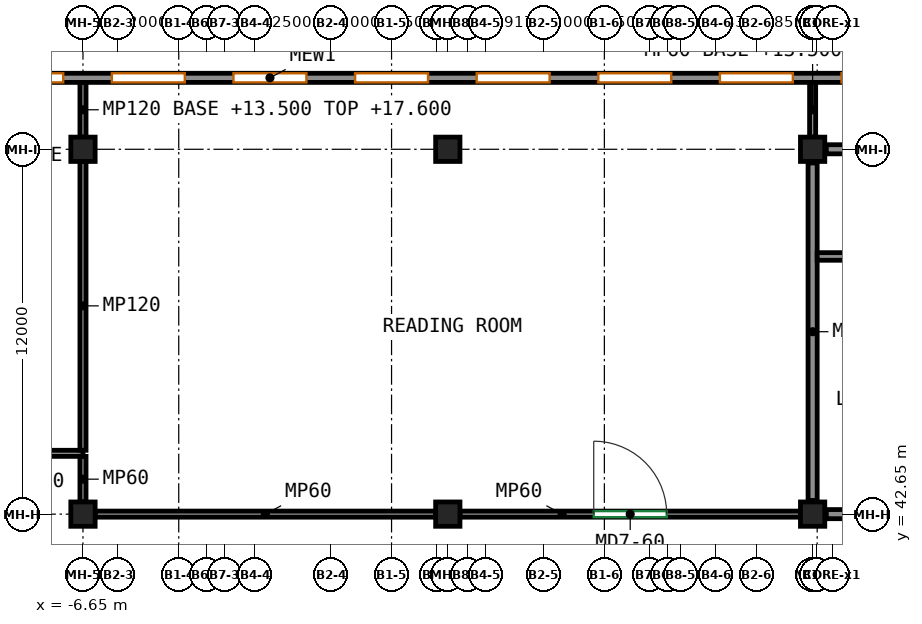
"""IFC4 building model, lengths in metres.
Left out: names, types, materials, properties, quantities, classifications, styles, units other than length and angle.
Written with IfcOpenShell. Run it as: python <this file> out.ifc"""

import sys

from ifc_helpers import new_model, si_unit, direction, frame, frame_2d, origin, origin_2d, place, context, subcontext, project, spatial, rectangle, extrude, source, transform, mapped, element, fill, save


model = new_model("IFC4")
c1 = context("Model", 3, precision=1e-05, world=origin(), true_north=direction((0.0, 1.0)))
c2 = subcontext(c1, "Body", "Model", "MODEL_VIEW")
j1 = project(units=[si_unit("LENGTHUNIT", "METRE"), si_unit("PLANEANGLEUNIT", "RADIAN")], contexts=[c1])
p1 = place(None, origin())
s1 = spatial("IfcSite", under=j1, at=p1, CompositionType="ELEMENT")
p2 = place(p1, origin())
s2 = spatial("IfcBuilding", under=s1, at=p2, CompositionType="ELEMENT")
p3 = place(p2, frame((0.0, 0.0, 13.5)))
s3 = spatial("IfcBuildingStorey", under=s2, at=p3, CompositionType="ELEMENT", Elevation=13.5)
m1 = source(origin(), c2, "Body", "SweptSolid", [
    extrude(rectangle(XDim=0.8, YDim=0.8, at=origin_2d()), origin(), (0.0, 0.0, 1.0), 4.1),
])
for number, where, z_axis, x_axis in (
    (1, (-6.65, 42.65, 0.0), (0.0, 0.0, 1.0), (1.0, 0.0, 0.0)),
    (2, (-6.65, 54.65, 0.0), (0.0, 0.0, 1.0), (1.0, 0.0, 0.0)),
    (3, (5.35, 42.65, 0.0), (0.0, 0.0, 1.0), (1.0, 0.0, 0.0)),
    (4, (5.35, 54.65, 0.0), (0.0, 0.0, 1.0), (1.0, 0.0, 0.0)),
    (5, (17.35, 42.65, 0.0), (0.0, 0.0, 1.0), (1.0, 0.0, 0.0)),
    (6, (17.35, 54.65, 0.0), (0.0, 0.0, 1.0), (1.0, 0.0, 0.0)),
):
    element("IfcColumn", number, at=place(p3, frame(where, z_axis=z_axis, x_axis=x_axis)), inside=s3, PredefinedType="COLUMN", context=c2, shape_type="MappedRepresentation", body=[
        mapped(m1, transform((0.0, 0.0, 0.0))),
    ])
m2 = source(origin(), c2, "Body", "SweptSolid", [
    extrude(rectangle(XDim=12.4, YDim=0.3, at=frame_2d((6.2, 0.0))), origin(), (0.0, 0.0, 1.0), 3.3),
])
p4 = place(p3, frame((30.2, 54.65, 0.0), z_axis=(0.0, 0.0, 1.0), x_axis=(-1.0, 0.0, 0.0)))
e7 = element("IfcWall", 7, at=p4, inside=s3, PredefinedType="SHEAR", context=c2, shape_type="MappedRepresentation", body=[
    mapped(m2, transform((0.0, 0.0, 0.0))),
])
p5 = place(p4, frame((5.7, 0.0, 0.0)))
e8 = element("IfcOpeningElement", 8, at=p5, cuts=e7, PredefinedType="OPENING", context=c2, shape_type="SweptSolid", body=[
    extrude(rectangle(XDim=1.0, YDim=2.1, at=frame_2d((0.5, 1.05))), frame((0.0, 0.16, 0.0), z_axis=(0.0, -1.0, 0.0), x_axis=(1.0, 0.0, 0.0)), (0.0, 0.0, 1.0), 0.32),
])
p6 = place(p3, frame((30.2, 42.65, 0.0), z_axis=(0.0, 0.0, 1.0), x_axis=(-1.0, 0.0, 0.0)))
e9 = element("IfcWall", 9, at=p6, inside=s3, PredefinedType="SHEAR", context=c2, shape_type="MappedRepresentation", body=[
    mapped(m2, transform((0.0, 0.0, 0.0))),
])
p7 = place(p6, frame((5.2, 0.0, 0.0)))
e10 = element("IfcOpeningElement", 10, at=p7, cuts=e9, PredefinedType="OPENING", context=c2, shape_type="SweptSolid", body=[
    extrude(rectangle(XDim=2.0, YDim=2.4, at=frame_2d((1.0, 1.2))), frame((0.0, 0.16, 0.0), z_axis=(0.0, -1.0, 0.0), x_axis=(1.0, 0.0, 0.0)), (0.0, 0.0, 1.0), 0.32),
])
m3 = source(origin(), c2, "Body", "SweptSolid", [
    extrude(rectangle(XDim=11.1, YDim=0.3, at=frame_2d((5.55, 0.0))), origin(), (0.0, 0.0, 1.0), 3.3),
])
p8 = place(p3, frame((17.35, 54.2, 0.0), z_axis=(0.0, 0.0, 1.0), x_axis=(0.0, -1.0, 0.0)))
e11 = element("IfcWall", 11, at=p8, inside=s3, PredefinedType="SHEAR", context=c2, shape_type="MappedRepresentation", body=[
    mapped(m3, transform((0.0, 0.0, 0.0))),
])
m4 = source(origin(), c2, "Body", "SweptSolid", [
    extrude(rectangle(XDim=4.15, YDim=0.25, at=frame_2d((2.075, 0.0))), origin(), (0.0, 0.0, 1.0), 4.1),
])
p9 = place(p3, frame((21.65, 51.125, 0.0), z_axis=(0.0, 0.0, 1.0), x_axis=(-1.0, 0.0, 0.0)))
e12 = element("IfcWall", 12, at=p9, inside=s3, PredefinedType="SHEAR", context=c2, shape_type="MappedRepresentation", body=[
    mapped(m4, transform((0.0, 0.0, 0.0))),
])
p10 = place(p9, frame((1.4, 0.0, 0.0)))
e13 = element("IfcOpeningElement", 13, at=p10, cuts=e12, PredefinedType="OPENING", context=c2, shape_type="SweptSolid", body=[
    extrude(rectangle(XDim=1.1, YDim=2.1, at=frame_2d((0.55, 1.05))), frame((0.0, 0.135, 0.0), z_axis=(0.0, -1.0, 0.0), x_axis=(1.0, 0.0, 0.0)), (0.0, 0.0, 1.0), 0.27),
])
m5 = source(origin(), c2, "Body", "SweptSolid", [
    extrude(rectangle(XDim=112.7, YDim=0.3, at=frame_2d((56.35, 0.0))), origin(), (0.0, 0.0, 1.0), 4.1),
])
p11 = place(p3, frame((-56.85, 57.0, 0.0), z_axis=(0.0, 0.0, 1.0), x_axis=(1.0, 0.0, 0.0)))
e14 = element("IfcWall", 14, at=p11, inside=s3, PredefinedType="SOLIDWALL", context=c2, shape_type="MappedRepresentation", body=[
    mapped(m5, transform((0.0, 0.0, 0.0))),
])
p12 = place(p11, frame((3.15, 0.0, 0.9)))
e15 = element("IfcOpeningElement", 15, at=p12, cuts=e14, PredefinedType="OPENING", context=c2, shape_type="SweptSolid", body=[
    extrude(rectangle(XDim=2.4, YDim=1.8, at=frame_2d((1.2, 0.9))), frame((0.0, 0.16, 0.0), z_axis=(0.0, -1.0, 0.0), x_axis=(1.0, 0.0, 0.0)), (0.0, 0.0, 1.0), 0.32),
])
p13 = place(p11, frame((7.15, 0.0, 0.9)))
e16 = element("IfcOpeningElement", 16, at=p13, cuts=e14, PredefinedType="OPENING", context=c2, shape_type="SweptSolid", body=[
    extrude(rectangle(XDim=2.4, YDim=1.8, at=frame_2d((1.2, 0.9))), frame((0.0, 0.16, 0.0), z_axis=(0.0, -1.0, 0.0), x_axis=(1.0, 0.0, 0.0)), (0.0, 0.0, 1.0), 0.32),
])
p14 = place(p11, frame((11.15, 0.0, 0.9)))
e17 = element("IfcOpeningElement", 17, at=p14, cuts=e14, PredefinedType="OPENING", context=c2, shape_type="SweptSolid", body=[
    extrude(rectangle(XDim=2.4, YDim=1.8, at=frame_2d((1.2, 0.9))), frame((0.0, 0.16, 0.0), z_axis=(0.0, -1.0, 0.0), x_axis=(1.0, 0.0, 0.0)), (0.0, 0.0, 1.0), 0.32),
])
p15 = place(p11, frame((15.15, 0.0, 0.9)))
e18 = element("IfcOpeningElement", 18, at=p15, cuts=e14, PredefinedType="OPENING", context=c2, shape_type="SweptSolid", body=[
    extrude(rectangle(XDim=2.4, YDim=1.8, at=frame_2d((1.2, 0.9))), frame((0.0, 0.16, 0.0), z_axis=(0.0, -1.0, 0.0), x_axis=(1.0, 0.0, 0.0)), (0.0, 0.0, 1.0), 0.32),
])
p16 = place(p11, frame((19.15, 0.0, 0.9)))
e19 = element("IfcOpeningElement", 19, at=p16, cuts=e14, PredefinedType="OPENING", context=c2, shape_type="SweptSolid", body=[
    extrude(rectangle(XDim=2.4, YDim=1.8, at=frame_2d((1.2, 0.9))), frame((0.0, 0.16, 0.0), z_axis=(0.0, -1.0, 0.0), x_axis=(1.0, 0.0, 0.0)), (0.0, 0.0, 1.0), 0.32),
])
p17 = place(p11, frame((23.15, 0.0, 0.9)))
e20 = element("IfcOpeningElement", 20, at=p17, cuts=e14, PredefinedType="OPENING", context=c2, shape_type="SweptSolid", body=[
    extrude(rectangle(XDim=2.4, YDim=1.8, at=frame_2d((1.2, 0.9))), frame((0.0, 0.16, 0.0), z_axis=(0.0, -1.0, 0.0), x_axis=(1.0, 0.0, 0.0)), (0.0, 0.0, 1.0), 0.32),
])
p18 = place(p11, frame((27.15, 0.0, 0.9)))
e21 = element("IfcOpeningElement", 21, at=p18, cuts=e14, PredefinedType="OPENING", context=c2, shape_type="SweptSolid", body=[
    extrude(rectangle(XDim=2.4, YDim=1.8, at=frame_2d((1.2, 0.9))), frame((0.0, 0.16, 0.0), z_axis=(0.0, -1.0, 0.0), x_axis=(1.0, 0.0, 0.0)), (0.0, 0.0, 1.0), 0.32),
])
p19 = place(p11, frame((31.15, 0.0, 0.9)))
e22 = element("IfcOpeningElement", 22, at=p19, cuts=e14, PredefinedType="OPENING", context=c2, shape_type="SweptSolid", body=[
    extrude(rectangle(XDim=2.4, YDim=1.8, at=frame_2d((1.2, 0.9))), frame((0.0, 0.16, 0.0), z_axis=(0.0, -1.0, 0.0), x_axis=(1.0, 0.0, 0.0)), (0.0, 0.0, 1.0), 0.32),
])
p20 = place(p11, frame((35.15, 0.0, 0.9)))
e23 = element("IfcOpeningElement", 23, at=p20, cuts=e14, PredefinedType="OPENING", context=c2, shape_type="SweptSolid", body=[
    extrude(rectangle(XDim=2.4, YDim=1.8, at=frame_2d((1.2, 0.9))), frame((0.0, 0.16, 0.0), z_axis=(0.0, -1.0, 0.0), x_axis=(1.0, 0.0, 0.0)), (0.0, 0.0, 1.0), 0.32),
])
p21 = place(p11, frame((43.15, 0.0, 0.9)))
e24 = element("IfcOpeningElement", 24, at=p21, cuts=e14, PredefinedType="OPENING", context=c2, shape_type="SweptSolid", body=[
    extrude(rectangle(XDim=2.4, YDim=1.8, at=frame_2d((1.2, 0.9))), frame((0.0, 0.16, 0.0), z_axis=(0.0, -1.0, 0.0), x_axis=(1.0, 0.0, 0.0)), (0.0, 0.0, 1.0), 0.32),
])
p22 = place(p11, frame((47.15, 0.0, 0.9)))
e25 = element("IfcOpeningElement", 25, at=p22, cuts=e14, PredefinedType="OPENING", context=c2, shape_type="SweptSolid", body=[
    extrude(rectangle(XDim=2.4, YDim=1.8, at=frame_2d((1.2, 0.9))), frame((0.0, 0.16, 0.0), z_axis=(0.0, -1.0, 0.0), x_axis=(1.0, 0.0, 0.0)), (0.0, 0.0, 1.0), 0.32),
])
p23 = place(p11, frame((51.15, 0.0, 0.9)))
e26 = element("IfcOpeningElement", 26, at=p23, cuts=e14, PredefinedType="OPENING", context=c2, shape_type="SweptSolid", body=[
    extrude(rectangle(XDim=2.4, YDim=1.8, at=frame_2d((1.2, 0.9))), frame((0.0, 0.16, 0.0), z_axis=(0.0, -1.0, 0.0), x_axis=(1.0, 0.0, 0.0)), (0.0, 0.0, 1.0), 0.32),
])
p24 = place(p11, frame((55.15, 0.0, 0.9)))
e27 = element("IfcOpeningElement", 27, at=p24, cuts=e14, PredefinedType="OPENING", context=c2, shape_type="SweptSolid", body=[
    extrude(rectangle(XDim=2.4, YDim=1.8, at=frame_2d((1.2, 0.9))), frame((0.0, 0.16, 0.0), z_axis=(0.0, -1.0, 0.0), x_axis=(1.0, 0.0, 0.0)), (0.0, 0.0, 1.0), 0.32),
])
p25 = place(p11, frame((59.15, 0.0, 0.9)))
e28 = element("IfcOpeningElement", 28, at=p25, cuts=e14, PredefinedType="OPENING", context=c2, shape_type="SweptSolid", body=[
    extrude(rectangle(XDim=2.4, YDim=1.8, at=frame_2d((1.2, 0.9))), frame((0.0, 0.16, 0.0), z_axis=(0.0, -1.0, 0.0), x_axis=(1.0, 0.0, 0.0)), (0.0, 0.0, 1.0), 0.32),
])
p26 = place(p11, frame((63.15, 0.0, 0.9)))
e29 = element("IfcOpeningElement", 29, at=p26, cuts=e14, PredefinedType="OPENING", context=c2, shape_type="SweptSolid", body=[
    extrude(rectangle(XDim=2.4, YDim=1.8, at=frame_2d((1.2, 0.9))), frame((0.0, 0.16, 0.0), z_axis=(0.0, -1.0, 0.0), x_axis=(1.0, 0.0, 0.0)), (0.0, 0.0, 1.0), 0.32),
])
p27 = place(p11, frame((67.15, 0.0, 0.9)))
e30 = element("IfcOpeningElement", 30, at=p27, cuts=e14, PredefinedType="OPENING", context=c2, shape_type="SweptSolid", body=[
    extrude(rectangle(XDim=2.4, YDim=1.8, at=frame_2d((1.2, 0.9))), frame((0.0, 0.16, 0.0), z_axis=(0.0, -1.0, 0.0), x_axis=(1.0, 0.0, 0.0)), (0.0, 0.0, 1.0), 0.32),
])
p28 = place(p11, frame((71.15, 0.0, 0.9)))
e31 = element("IfcOpeningElement", 31, at=p28, cuts=e14, PredefinedType="OPENING", context=c2, shape_type="SweptSolid", body=[
    extrude(rectangle(XDim=2.4, YDim=1.8, at=frame_2d((1.2, 0.9))), frame((0.0, 0.16, 0.0), z_axis=(0.0, -1.0, 0.0), x_axis=(1.0, 0.0, 0.0)), (0.0, 0.0, 1.0), 0.32),
])
p29 = place(p11, frame((75.15, 0.0, 0.9)))
e32 = element("IfcOpeningElement", 32, at=p29, cuts=e14, PredefinedType="OPENING", context=c2, shape_type="SweptSolid", body=[
    extrude(rectangle(XDim=2.4, YDim=1.8, at=frame_2d((1.2, 0.9))), frame((0.0, 0.16, 0.0), z_axis=(0.0, -1.0, 0.0), x_axis=(1.0, 0.0, 0.0)), (0.0, 0.0, 1.0), 0.32),
])
p30 = place(p11, frame((79.15, 0.0, 0.9)))
e33 = element("IfcOpeningElement", 33, at=p30, cuts=e14, PredefinedType="OPENING", context=c2, shape_type="SweptSolid", body=[
    extrude(rectangle(XDim=2.4, YDim=1.8, at=frame_2d((1.2, 0.9))), frame((0.0, 0.16, 0.0), z_axis=(0.0, -1.0, 0.0), x_axis=(1.0, 0.0, 0.0)), (0.0, 0.0, 1.0), 0.32),
])
p31 = place(p11, frame((83.15, 0.0, 0.9)))
e34 = element("IfcOpeningElement", 34, at=p31, cuts=e14, PredefinedType="OPENING", context=c2, shape_type="SweptSolid", body=[
    extrude(rectangle(XDim=2.4, YDim=1.8, at=frame_2d((1.2, 0.9))), frame((0.0, 0.16, 0.0), z_axis=(0.0, -1.0, 0.0), x_axis=(1.0, 0.0, 0.0)), (0.0, 0.0, 1.0), 0.32),
])
p32 = place(p11, frame((87.15, 0.0, 0.9)))
e35 = element("IfcOpeningElement", 35, at=p32, cuts=e14, PredefinedType="OPENING", context=c2, shape_type="SweptSolid", body=[
    extrude(rectangle(XDim=2.4, YDim=1.8, at=frame_2d((1.2, 0.9))), frame((0.0, 0.16, 0.0), z_axis=(0.0, -1.0, 0.0), x_axis=(1.0, 0.0, 0.0)), (0.0, 0.0, 1.0), 0.32),
])
p33 = place(p11, frame((91.15, 0.0, 0.9)))
e36 = element("IfcOpeningElement", 36, at=p33, cuts=e14, PredefinedType="OPENING", context=c2, shape_type="SweptSolid", body=[
    extrude(rectangle(XDim=2.4, YDim=1.8, at=frame_2d((1.2, 0.9))), frame((0.0, 0.16, 0.0), z_axis=(0.0, -1.0, 0.0), x_axis=(1.0, 0.0, 0.0)), (0.0, 0.0, 1.0), 0.32),
])
p34 = place(p11, frame((95.15, 0.0, 0.9)))
e37 = element("IfcOpeningElement", 37, at=p34, cuts=e14, PredefinedType="OPENING", context=c2, shape_type="SweptSolid", body=[
    extrude(rectangle(XDim=2.4, YDim=1.8, at=frame_2d((1.2, 0.9))), frame((0.0, 0.16, 0.0), z_axis=(0.0, -1.0, 0.0), x_axis=(1.0, 0.0, 0.0)), (0.0, 0.0, 1.0), 0.32),
])
p35 = place(p11, frame((103.15, 0.0, 0.9)))
e38 = element("IfcOpeningElement", 38, at=p35, cuts=e14, PredefinedType="OPENING", context=c2, shape_type="SweptSolid", body=[
    extrude(rectangle(XDim=2.4, YDim=1.8, at=frame_2d((1.2, 0.9))), frame((0.0, 0.16, 0.0), z_axis=(0.0, -1.0, 0.0), x_axis=(1.0, 0.0, 0.0)), (0.0, 0.0, 1.0), 0.32),
])
p36 = place(p11, frame((107.15, 0.0, 0.9)))
e39 = element("IfcOpeningElement", 39, at=p36, cuts=e14, PredefinedType="OPENING", context=c2, shape_type="SweptSolid", body=[
    extrude(rectangle(XDim=2.4, YDim=1.8, at=frame_2d((1.2, 0.9))), frame((0.0, 0.16, 0.0), z_axis=(0.0, -1.0, 0.0), x_axis=(1.0, 0.0, 0.0)), (0.0, 0.0, 1.0), 0.32),
])
m6 = source(origin(), c2, "Body", "SweptSolid", [
    extrude(rectangle(XDim=3.9, YDim=0.2, at=frame_2d((1.95, 0.0))), origin(), (0.0, 0.0, 1.0), 3.3),
])
p37 = place(p3, frame((-10.55, 44.65, 0.0), z_axis=(0.0, 0.0, 1.0), x_axis=(1.0, 0.0, 0.0)))
e40 = element("IfcWall", 40, at=p37, inside=s3, PredefinedType="PARTITIONING", context=c2, shape_type="MappedRepresentation", body=[
    mapped(m6, transform((0.0, 0.0, 0.0))),
])
p38 = place(p37, frame((1.35, 0.0, 0.0)))
e41 = element("IfcOpeningElement", 41, at=p38, cuts=e40, PredefinedType="OPENING", context=c2, shape_type="SweptSolid", body=[
    extrude(rectangle(XDim=1.2, YDim=2.1, at=frame_2d((0.6, 1.05))), frame((0.0, 0.11, 0.0), z_axis=(0.0, -1.0, 0.0), x_axis=(1.0, 0.0, 0.0)), (0.0, 0.0, 1.0), 0.22),
])
m7 = source(origin(), c2, "Body", "SweptSolid", [
    extrude(rectangle(XDim=1.5, YDim=0.2, at=frame_2d((0.75, 0.0))), origin(), (0.0, 0.0, 1.0), 3.3),
])
p39 = place(p3, frame((-6.65, 44.55, 0.0), z_axis=(0.0, 0.0, 1.0), x_axis=(0.0, -1.0, 0.0)))
e42 = element("IfcWall", 42, at=p39, inside=s3, PredefinedType="PARTITIONING", context=c2, shape_type="MappedRepresentation", body=[
    mapped(m7, transform((0.0, 0.0, 0.0))),
])
m8 = source(origin(), c2, "Body", "SweptSolid", [
    extrude(rectangle(XDim=9.5, YDim=0.2, at=frame_2d((4.75, 0.0))), origin(), (0.0, 0.0, 1.0), 3.3),
])
p40 = place(p3, frame((-6.65, 54.25, 0.0), z_axis=(0.0, 0.0, 1.0), x_axis=(0.0, -1.0, 0.0)))
e43 = element("IfcWall", 43, at=p40, inside=s3, PredefinedType="PARTITIONING", context=c2, shape_type="MappedRepresentation", body=[
    mapped(m8, transform((0.0, 0.0, 0.0))),
])
m9 = source(origin(), c2, "Body", "SweptSolid", [
    extrude(rectangle(XDim=1.8, YDim=0.2, at=frame_2d((0.9, 0.0))), origin(), (0.0, 0.0, 1.0), 4.1),
])
p41 = place(p3, frame((-6.65, 56.85, 0.0), z_axis=(0.0, 0.0, 1.0), x_axis=(0.0, -1.0, 0.0)))
e44 = element("IfcWall", 44, at=p41, inside=s3, PredefinedType="PARTITIONING", context=c2, shape_type="MappedRepresentation", body=[
    mapped(m9, transform((0.0, 0.0, 0.0))),
])
m10 = source(origin(), c2, "Body", "SweptSolid", [
    extrude(rectangle(XDim=11.2, YDim=0.2, at=frame_2d((5.6, 0.0))), origin(), (0.0, 0.0, 1.0), 3.3),
])
p42 = place(p3, frame((-6.25, 42.65, 0.0), z_axis=(0.0, 0.0, 1.0), x_axis=(1.0, 0.0, 0.0)))
e45 = element("IfcWall", 45, at=p42, inside=s3, PredefinedType="PARTITIONING", context=c2, shape_type="MappedRepresentation", body=[
    mapped(m10, transform((0.0, 0.0, 0.0))),
])
p43 = place(p3, frame((5.75, 42.65, 0.0), z_axis=(0.0, 0.0, 1.0), x_axis=(1.0, 0.0, 0.0)))
e46 = element("IfcWall", 46, at=p43, inside=s3, PredefinedType="PARTITIONING", context=c2, shape_type="MappedRepresentation", body=[
    mapped(m10, transform((0.0, 0.0, 0.0))),
])
p44 = place(p43, frame((4.4, 0.0, 0.0)))
e47 = element("IfcOpeningElement", 47, at=p44, cuts=e46, PredefinedType="OPENING", context=c2, shape_type="SweptSolid", body=[
    extrude(rectangle(XDim=2.4, YDim=2.4, at=frame_2d((1.2, 1.2))), frame((0.0, 0.11, 0.0), z_axis=(0.0, -1.0, 0.0), x_axis=(1.0, 0.0, 0.0)), (0.0, 0.0, 1.0), 0.22),
])
p45 = place(p3, frame((17.35, 56.85, 0.0), z_axis=(0.0, 0.0, 1.0), x_axis=(0.0, -1.0, 0.0)))
e48 = element("IfcWall", 48, at=p45, inside=s3, PredefinedType="PARTITIONING", context=c2, shape_type="MappedRepresentation", body=[
    mapped(m9, transform((0.0, 0.0, 0.0))),
])
p46 = place(p22, origin())
e49 = element("IfcWindow", 49, at=p46, inside=s3, PartitioningType="SINGLE_PANEL", PredefinedType="WINDOW", context=c2, shape_type="SweptSolid", body=[
    extrude(rectangle(XDim=2.4, YDim=1.8, at=frame_2d((1.2, 0.9))), frame((0.0, 0.03, 0.0), z_axis=(0.0, -1.0, 0.0), x_axis=(1.0, 0.0, 0.0)), (0.0, 0.0, 1.0), 0.06),
])
fill(e25, e49)
p47 = place(p23, origin())
e50 = element("IfcWindow", 50, at=p47, inside=s3, PartitioningType="SINGLE_PANEL", PredefinedType="WINDOW", context=c2, shape_type="SweptSolid", body=[
    extrude(rectangle(XDim=2.4, YDim=1.8, at=frame_2d((1.2, 0.9))), frame((0.0, 0.03, 0.0), z_axis=(0.0, -1.0, 0.0), x_axis=(1.0, 0.0, 0.0)), (0.0, 0.0, 1.0), 0.06),
])
fill(e26, e50)
p48 = place(p24, origin())
e51 = element("IfcWindow", 51, at=p48, inside=s3, PartitioningType="SINGLE_PANEL", PredefinedType="WINDOW", context=c2, shape_type="SweptSolid", body=[
    extrude(rectangle(XDim=2.4, YDim=1.8, at=frame_2d((1.2, 0.9))), frame((0.0, 0.03, 0.0), z_axis=(0.0, -1.0, 0.0), x_axis=(1.0, 0.0, 0.0)), (0.0, 0.0, 1.0), 0.06),
])
fill(e27, e51)
p49 = place(p25, origin())
e52 = element("IfcWindow", 52, at=p49, inside=s3, PartitioningType="SINGLE_PANEL", PredefinedType="WINDOW", context=c2, shape_type="SweptSolid", body=[
    extrude(rectangle(XDim=2.4, YDim=1.8, at=frame_2d((1.2, 0.9))), frame((0.0, 0.03, 0.0), z_axis=(0.0, -1.0, 0.0), x_axis=(1.0, 0.0, 0.0)), (0.0, 0.0, 1.0), 0.06),
])
fill(e28, e52)
p50 = place(p26, origin())
e53 = element("IfcWindow", 53, at=p50, inside=s3, PartitioningType="SINGLE_PANEL", PredefinedType="WINDOW", context=c2, shape_type="SweptSolid", body=[
    extrude(rectangle(XDim=2.4, YDim=1.8, at=frame_2d((1.2, 0.9))), frame((0.0, 0.03, 0.0), z_axis=(0.0, -1.0, 0.0), x_axis=(1.0, 0.0, 0.0)), (0.0, 0.0, 1.0), 0.06),
])
fill(e29, e53)
p51 = place(p27, origin())
e54 = element("IfcWindow", 54, at=p51, inside=s3, PartitioningType="SINGLE_PANEL", PredefinedType="WINDOW", context=c2, shape_type="SweptSolid", body=[
    extrude(rectangle(XDim=2.4, YDim=1.8, at=frame_2d((1.2, 0.9))), frame((0.0, 0.03, 0.0), z_axis=(0.0, -1.0, 0.0), x_axis=(1.0, 0.0, 0.0)), (0.0, 0.0, 1.0), 0.06),
])
fill(e30, e54)
p52 = place(p28, origin())
e55 = element("IfcWindow", 55, at=p52, inside=s3, PartitioningType="SINGLE_PANEL", PredefinedType="WINDOW", context=c2, shape_type="SweptSolid", body=[
    extrude(rectangle(XDim=2.4, YDim=1.8, at=frame_2d((1.2, 0.9))), frame((0.0, 0.03, 0.0), z_axis=(0.0, -1.0, 0.0), x_axis=(1.0, 0.0, 0.0)), (0.0, 0.0, 1.0), 0.06),
])
fill(e31, e55)
p53 = place(p29, origin())
e56 = element("IfcWindow", 56, at=p53, inside=s3, PartitioningType="SINGLE_PANEL", PredefinedType="WINDOW", context=c2, shape_type="SweptSolid", body=[
    extrude(rectangle(XDim=2.4, YDim=1.8, at=frame_2d((1.2, 0.9))), frame((0.0, 0.03, 0.0), z_axis=(0.0, -1.0, 0.0), x_axis=(1.0, 0.0, 0.0)), (0.0, 0.0, 1.0), 0.06),
])
fill(e32, e56)
p54 = place(p44, origin())
e57 = element("IfcDoor", 57, at=p54, inside=s3, OperationType="DOUBLE_DOOR_SINGLE_SWING", PredefinedType="DOOR", context=c2, shape_type="SweptSolid", body=[
    extrude(rectangle(XDim=2.4, YDim=2.4, at=frame_2d((1.2, 1.2))), frame((0.0, 0.025, 0.0), z_axis=(0.0, -1.0, 0.0), x_axis=(1.0, 0.0, 0.0)), (0.0, 0.0, 1.0), 0.05),
])
fill(e47, e57)
save(model, sys.argv[1])
